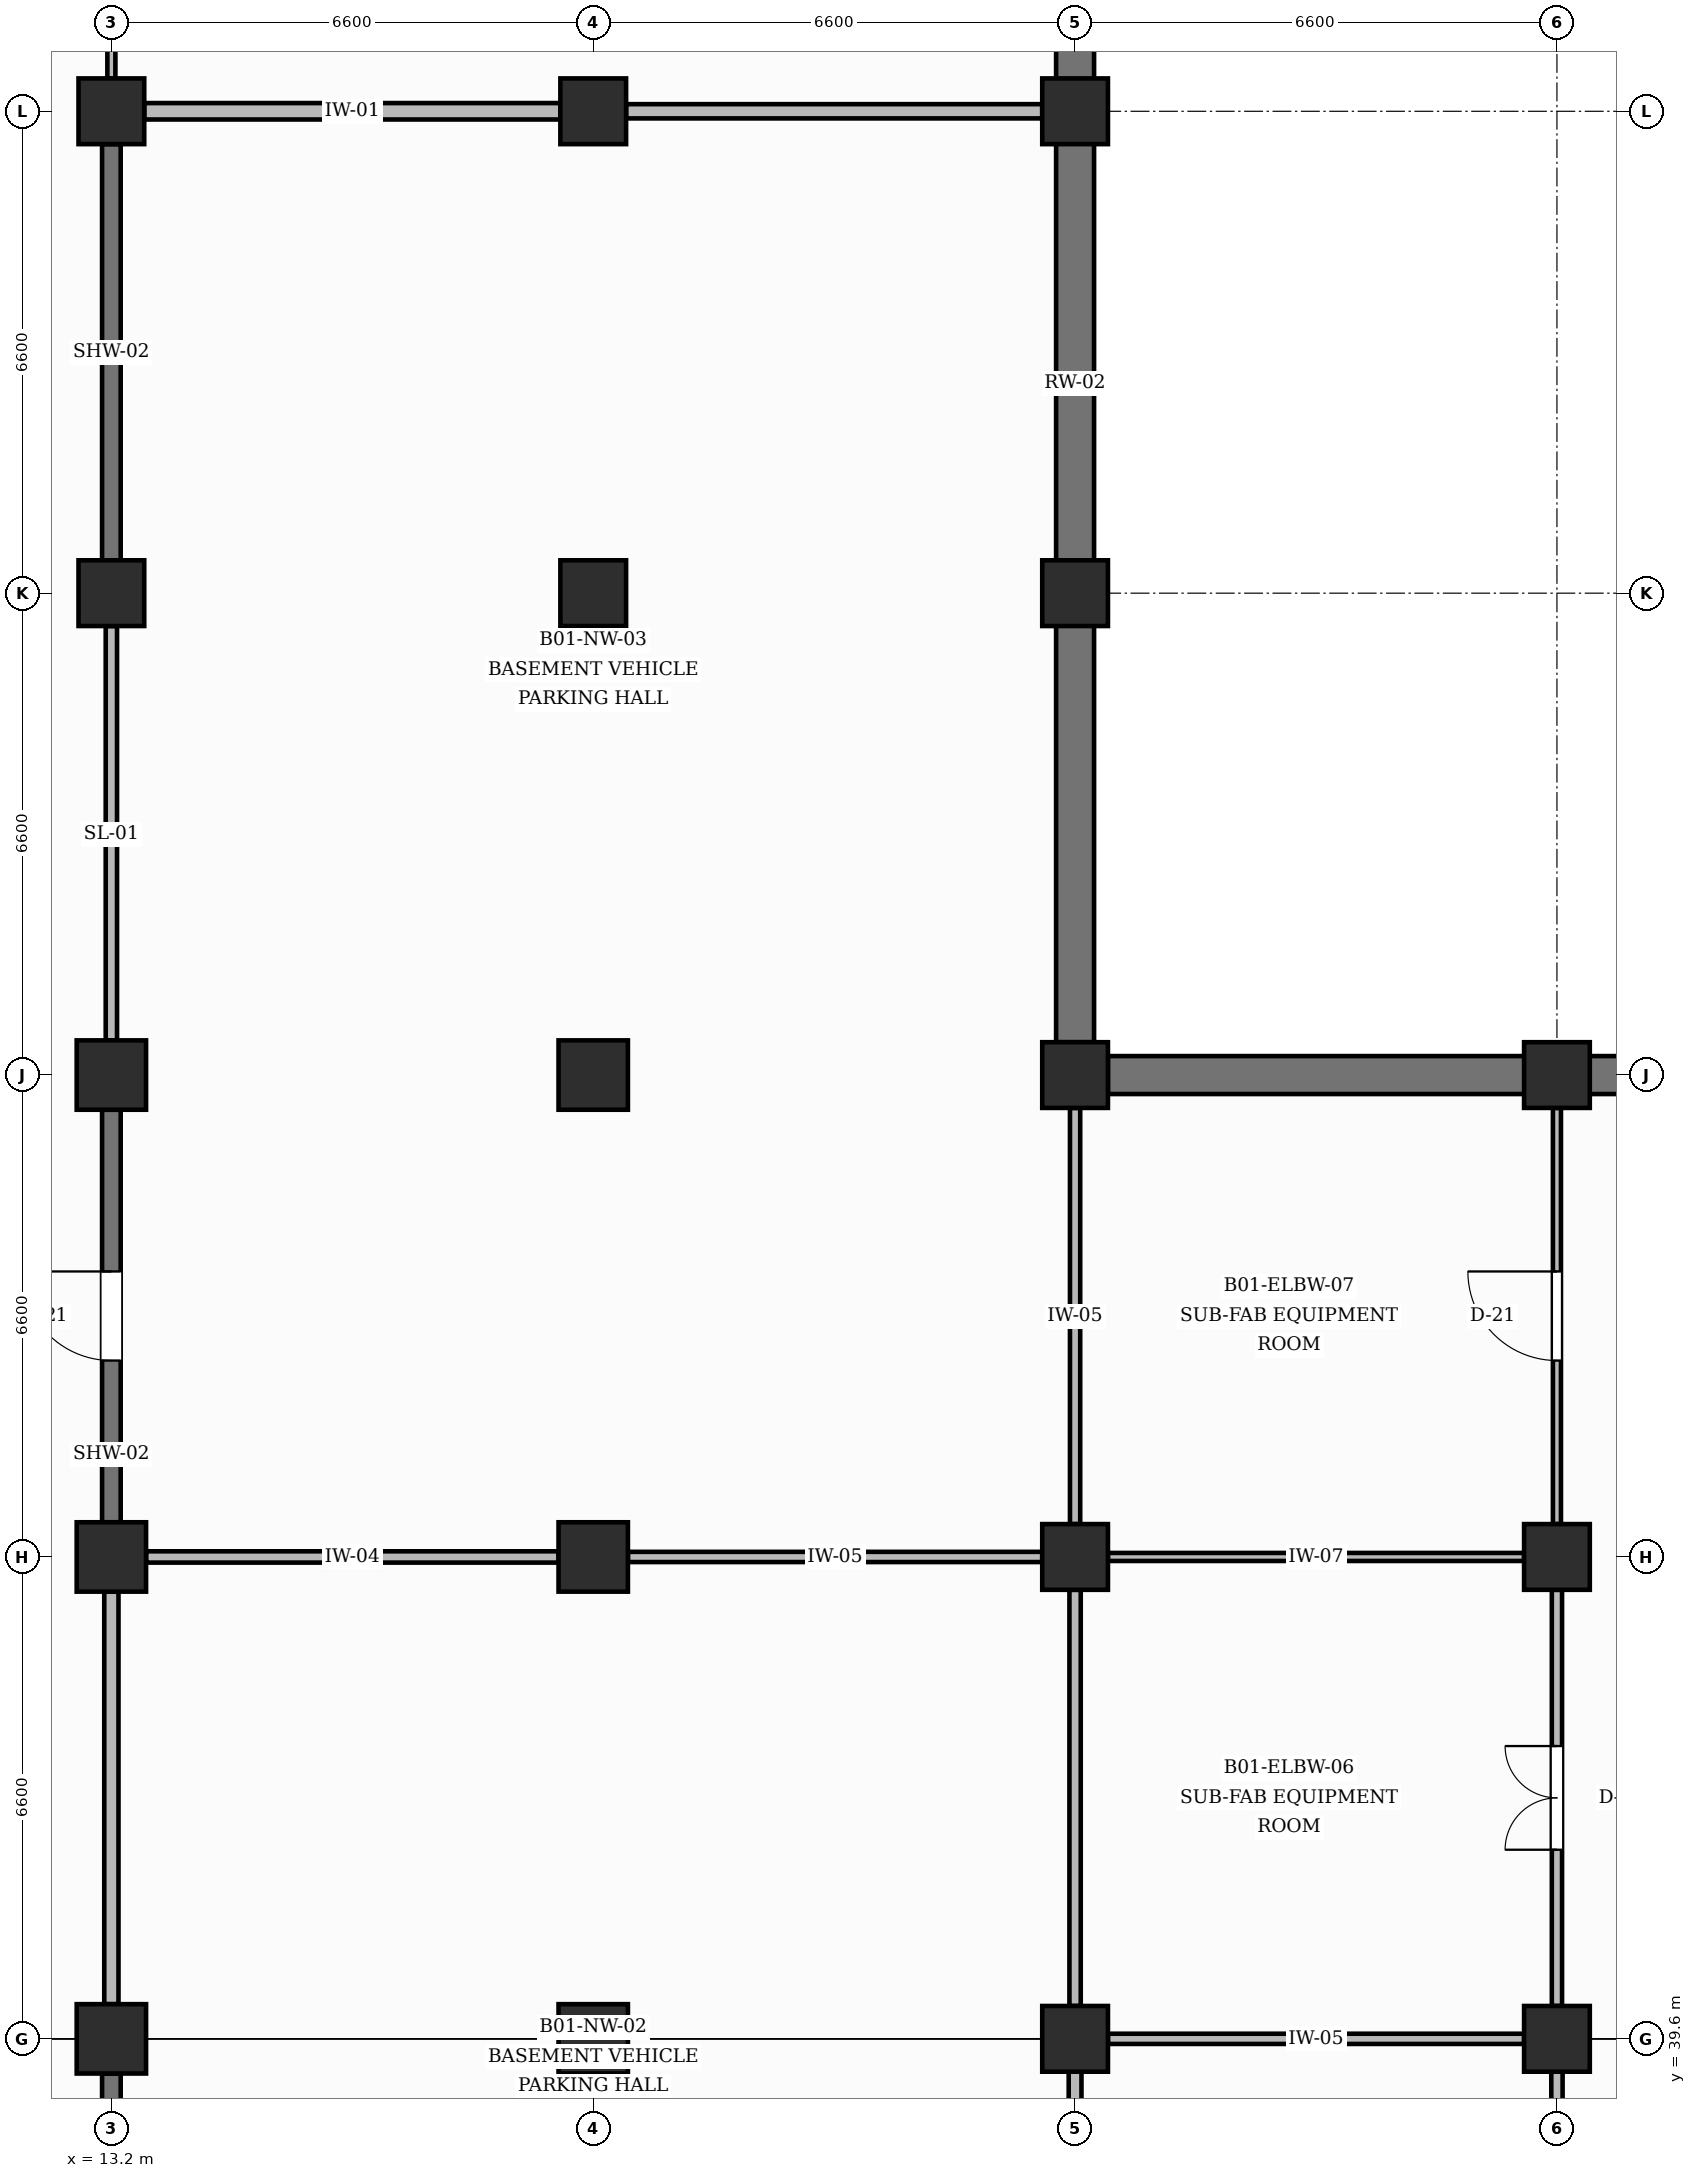
"""IFC4 building model, lengths in metres.
Left out: names, types, materials, properties, quantities, classifications, styles, units other than length and angle.
Written with IfcOpenShell. Run it as: python <this file> out.ifc"""

import sys

from ifc_helpers import new_model, si_unit, direction, frame, frame_2d, origin, origin_2d, place, context, subcontext, project, spatial, rectangle, extrude, element, fill, save


model = new_model("IFC4")
c1 = context("Model", 3, precision=1e-05, world=origin(), true_north=direction((0.0, 1.0)))
c2 = subcontext(c1, "Body", "Model", "MODEL_VIEW")
j1 = project(units=[si_unit("LENGTHUNIT", "METRE"), si_unit("PLANEANGLEUNIT", "RADIAN")], contexts=[c1])
p1 = place(None, origin())
s1 = spatial("IfcSite", under=j1, at=p1, CompositionType="ELEMENT")
p2 = place(p1, origin())
s2 = spatial("IfcBuilding", under=s1, at=p2, CompositionType="ELEMENT")
p3 = place(p2, frame((0.0, 0.0, -4.5)))
s3 = spatial("IfcBuildingStorey", under=s2, at=p3, CompositionType="ELEMENT", Elevation=-4.5)
for number, where, z_axis, x_axis in (
    (1, (13.2, 39.6, 0.0), (0.0, 0.0, 1.0), (1.0, 0.0, 0.0)),
    (2, (13.2, 46.2, 0.0), (0.0, 0.0, 1.0), (1.0, 0.0, 0.0)),
    (3, (13.2, 52.8, 0.0), (0.0, 0.0, 1.0), (1.0, 0.0, 0.0)),
):
    element("IfcColumn", number, at=place(p3, frame(where, z_axis=z_axis, x_axis=x_axis)), inside=s3, PredefinedType="COLUMN", context=c2, shape_type="SweptSolid", body=[
        extrude(rectangle(XDim=0.95, YDim=0.95, at=origin_2d()), origin(), (0.0, 0.0, 1.0), 4.5),
    ])
for number, where, z_axis, x_axis in (
    (4, (13.2, 59.4, 0.0), (0.0, 0.0, 1.0), (1.0, 0.0, 0.0)),
    (5, (13.2, 66.0, 0.0), (0.0, 0.0, 1.0), (1.0, 0.0, 0.0)),
):
    element("IfcColumn", number, at=place(p3, frame(where, z_axis=z_axis, x_axis=x_axis)), inside=s3, PredefinedType="COLUMN", context=c2, shape_type="SweptSolid", body=[
        extrude(rectangle(XDim=0.9, YDim=0.9, at=origin_2d()), origin(), (0.0, 0.0, 1.0), 4.5),
    ])
for number, where, z_axis, x_axis in (
    (6, (19.8, 39.6, 0.0), (0.0, 0.0, 1.0), (1.0, 0.0, 0.0)),
    (7, (19.8, 46.2, 0.0), (0.0, 0.0, 1.0), (1.0, 0.0, 0.0)),
    (8, (19.8, 52.8, 0.0), (0.0, 0.0, 1.0), (1.0, 0.0, 0.0)),
):
    element("IfcColumn", number, at=place(p3, frame(where, z_axis=z_axis, x_axis=x_axis)), inside=s3, PredefinedType="COLUMN", context=c2, shape_type="SweptSolid", body=[
        extrude(rectangle(XDim=0.95, YDim=0.95, at=origin_2d()), origin(), (0.0, 0.0, 1.0), 4.5),
    ])
for number, where, z_axis, x_axis in (
    (9, (19.8, 59.4, 0.0), (0.0, 0.0, 1.0), (1.0, 0.0, 0.0)),
    (10, (19.8, 66.0, 0.0), (0.0, 0.0, 1.0), (1.0, 0.0, 0.0)),
    (11, (26.4, 39.6, 0.0), (0.0, 0.0, 1.0), (1.0, 0.0, 0.0)),
    (12, (26.4, 46.2, 0.0), (0.0, 0.0, 1.0), (1.0, 0.0, 0.0)),
    (13, (26.4, 52.8, 0.0), (0.0, 0.0, 1.0), (1.0, 0.0, 0.0)),
    (14, (26.4, 59.4, 0.0), (0.0, 0.0, 1.0), (1.0, 0.0, 0.0)),
    (15, (26.4, 66.0, 0.0), (0.0, 0.0, 1.0), (1.0, 0.0, 0.0)),
    (16, (33.0, 39.6, 0.0), (0.0, 0.0, 1.0), (1.0, 0.0, 0.0)),
    (17, (33.0, 46.2, 0.0), (0.0, 0.0, 1.0), (1.0, 0.0, 0.0)),
    (18, (33.0, 52.8, 0.0), (0.0, 0.0, 1.0), (1.0, 0.0, 0.0)),
):
    element("IfcColumn", number, at=place(p3, frame(where, z_axis=z_axis, x_axis=x_axis)), inside=s3, PredefinedType="COLUMN", context=c2, shape_type="SweptSolid", body=[
        extrude(rectangle(XDim=0.9, YDim=0.9, at=origin_2d()), origin(), (0.0, 0.0, 1.0), 4.5),
    ])
for number, where, z_axis, x_axis in (
    (19, (26.4, 53.25, 0.0), (0.0, 0.0, 1.0), (0.0, 1.0, 0.0)),
    (20, (26.4, 59.85, 0.0), (0.0, 0.0, 1.0), (0.0, 1.0, 0.0)),
    (21, (26.4, 66.45, 0.0), (0.0, 0.0, 1.0), (0.0, 1.0, 0.0)),
    (22, (26.85, 52.8, 0.0), (0.0, 0.0, 1.0), (1.0, 0.0, 0.0)),
    (23, (33.45, 52.8, 0.0), (0.0, 0.0, 1.0), (1.0, 0.0, 0.0)),
):
    element("IfcWall", number, at=place(p3, frame(where, z_axis=z_axis, x_axis=x_axis)), inside=s3, PredefinedType="USERDEFINED", context=c2, shape_type="SweptSolid", body=[
        extrude(rectangle(XDim=5.7, YDim=0.52, at=frame_2d((2.85, 0.0))), origin(), (0.0, 0.0, 1.0), 3.49),
    ])
p4 = place(p3, frame((13.2, 33.475, 0.0), z_axis=(0.0, 0.0, 1.0), x_axis=(0.0, 1.0, 0.0)))
e24 = element("IfcWall", 24, at=p4, inside=s3, PredefinedType="SHEAR", context=c2, shape_type="SweptSolid", body=[
    extrude(rectangle(XDim=5.65, YDim=0.255, at=frame_2d((2.825, 0.0))), origin(), (0.0, 0.0, 1.0), 3.34),
])
p5 = place(p3, frame((13.2, 40.075, 0.0), z_axis=(0.0, 0.0, 1.0), x_axis=(0.0, 1.0, 0.0)))
e25 = element("IfcWall", 25, at=p5, inside=s3, PredefinedType="PARTITIONING", context=c2, shape_type="SweptSolid", body=[
    extrude(rectangle(XDim=5.65, YDim=0.195, at=frame_2d((2.825, 0.0))), origin(), (0.0, 0.0, 1.0), 3.34),
])
p6 = place(p3, frame((13.2, 46.675, 0.0), z_axis=(0.0, 0.0, 1.0), x_axis=(0.0, 1.0, 0.0)))
e26 = element("IfcWall", 26, at=p6, inside=s3, PredefinedType="SHEAR", context=c2, shape_type="SweptSolid", body=[
    extrude(rectangle(XDim=5.65, YDim=0.255, at=frame_2d((2.825, 0.0))), origin(), (0.0, 0.0, 1.0), 3.34),
])
p7 = place(p6, frame((2.215, 0.0, 0.0)))
e27 = element("IfcOpeningElement", 27, at=p7, cuts=e26, PredefinedType="OPENING", context=c2, shape_type="SweptSolid", body=[
    extrude(rectangle(XDim=1.22, YDim=2.15, at=frame_2d((0.61, 1.075))), frame((0.0, 0.137, 0.0), z_axis=(0.0, -1.0, 0.0), x_axis=(1.0, 0.0, 0.0)), (0.0, 0.0, 1.0), 0.275),
])
p8 = place(p3, frame((13.2, 53.275, 0.0), z_axis=(0.0, 0.0, 1.0), x_axis=(0.0, 1.0, 0.0)))
e28 = element("IfcWall", 28, at=p8, inside=s3, PredefinedType="PARTITIONING", context=c2, shape_type="SweptSolid", body=[
    extrude(rectangle(XDim=5.675, YDim=0.155, at=frame_2d((2.837, 0.0))), origin(), (0.0, 0.0, 1.0), 3.34),
])
p9 = place(p3, frame((13.2, 59.85, 0.0), z_axis=(0.0, 0.0, 1.0), x_axis=(0.0, 1.0, 0.0)))
e29 = element("IfcWall", 29, at=p9, inside=s3, PredefinedType="SHEAR", context=c2, shape_type="SweptSolid", body=[
    extrude(rectangle(XDim=5.7, YDim=0.255, at=frame_2d((2.85, 0.0))), origin(), (0.0, 0.0, 1.0), 3.34),
])
p10 = place(p3, frame((13.2, 66.45, 0.0), z_axis=(0.0, 0.0, 1.0), x_axis=(0.0, 1.0, 0.0)))
e30 = element("IfcWall", 30, at=p10, inside=s3, PredefinedType="PARTITIONING", context=c2, shape_type="SweptSolid", body=[
    extrude(rectangle(XDim=5.7, YDim=0.11, at=frame_2d((2.85, 0.0))), origin(), (0.0, 0.0, 1.0), 3.34),
])
p11 = place(p10, frame((2.14, 0.0, 0.0)))
e31 = element("IfcOpeningElement", 31, at=p11, cuts=e30, PredefinedType="OPENING", context=c2, shape_type="SweptSolid", body=[
    extrude(rectangle(XDim=1.42, YDim=2.2, at=frame_2d((0.71, 1.1))), frame((0.0, 0.065, 0.0), z_axis=(0.0, -1.0, 0.0), x_axis=(1.0, 0.0, 0.0)), (0.0, 0.0, 1.0), 0.13),
])
p12 = place(p3, frame((13.675, 46.2, 0.0), z_axis=(0.0, 0.0, 1.0), x_axis=(1.0, 0.0, 0.0)))
e32 = element("IfcWall", 32, at=p12, inside=s3, PredefinedType="PARTITIONING", context=c2, shape_type="SweptSolid", body=[
    extrude(rectangle(XDim=5.65, YDim=0.155, at=frame_2d((2.825, 0.0))), origin(), (0.0, 0.0, 1.0), 3.34),
])
p13 = place(p3, frame((13.65, 66.0, 0.0), z_axis=(0.0, 0.0, 1.0), x_axis=(1.0, 0.0, 0.0)))
e33 = element("IfcWall", 33, at=p13, inside=s3, PredefinedType="PARTITIONING", context=c2, shape_type="SweptSolid", body=[
    extrude(rectangle(XDim=5.7, YDim=0.225, at=frame_2d((2.85, 0.0))), origin(), (0.0, 0.0, 1.0), 3.24),
])
p14 = place(p3, frame((26.4, 33.45, 0.0), z_axis=(0.0, 0.0, 1.0), x_axis=(0.0, 1.0, 0.0)))
e34 = element("IfcWall", 34, at=p14, inside=s3, PredefinedType="PARTITIONING", context=c2, shape_type="SweptSolid", body=[
    extrude(rectangle(XDim=5.7, YDim=0.175, at=frame_2d((2.85, 0.0))), origin(), (0.0, 0.0, 1.0), 3.34),
])
p15 = place(p3, frame((26.4, 40.05, 0.0), z_axis=(0.0, 0.0, 1.0), x_axis=(0.0, 1.0, 0.0)))
e35 = element("IfcWall", 35, at=p15, inside=s3, PredefinedType="PARTITIONING", context=c2, shape_type="SweptSolid", body=[
    extrude(rectangle(XDim=5.7, YDim=0.155, at=frame_2d((2.85, 0.0))), origin(), (0.0, 0.0, 1.0), 3.34),
])
p16 = place(p3, frame((20.275, 46.2, 0.0), z_axis=(0.0, 0.0, 1.0), x_axis=(1.0, 0.0, 0.0)))
e36 = element("IfcWall", 36, at=p16, inside=s3, PredefinedType="PARTITIONING", context=c2, shape_type="SweptSolid", body=[
    extrude(rectangle(XDim=5.675, YDim=0.14, at=frame_2d((2.837, 0.0))), origin(), (0.0, 0.0, 1.0), 3.24),
])
p17 = place(p3, frame((26.4, 46.65, 0.0), z_axis=(0.0, 0.0, 1.0), x_axis=(0.0, 1.0, 0.0)))
e37 = element("IfcWall", 37, at=p17, inside=s3, PredefinedType="PARTITIONING", context=c2, shape_type="SweptSolid", body=[
    extrude(rectangle(XDim=5.7, YDim=0.14, at=frame_2d((2.85, 0.0))), origin(), (0.0, 0.0, 1.0), 3.34),
])
p18 = place(p3, frame((20.25, 66.0, 0.0), z_axis=(0.0, 0.0, 1.0), x_axis=(1.0, 0.0, 0.0)))
e38 = element("IfcWall", 38, at=p18, inside=s3, PredefinedType="PARTITIONING", context=c2, shape_type="SweptSolid", body=[
    extrude(rectangle(XDim=5.7, YDim=0.195, at=frame_2d((2.85, 0.0))), origin(), (0.0, 0.0, 1.0), 3.34),
])
p19 = place(p3, frame((33.0, 33.45, 0.0), z_axis=(0.0, 0.0, 1.0), x_axis=(0.0, 1.0, 0.0)))
e39 = element("IfcWall", 39, at=p19, inside=s3, PredefinedType="PARTITIONING", context=c2, shape_type="SweptSolid", body=[
    extrude(rectangle(XDim=5.7, YDim=0.155, at=frame_2d((2.85, 0.0))), origin(), (0.0, 0.0, 1.0), 3.34),
])
p20 = place(p19, frame((2.24, 0.0, 0.0)))
e40 = element("IfcOpeningElement", 40, at=p20, cuts=e39, PredefinedType="OPENING", context=c2, shape_type="SweptSolid", body=[
    extrude(rectangle(XDim=1.22, YDim=2.15, at=frame_2d((0.61, 1.075))), frame((0.0, 0.087, 0.0), z_axis=(0.0, -1.0, 0.0), x_axis=(1.0, 0.0, 0.0)), (0.0, 0.0, 1.0), 0.175),
])
p21 = place(p3, frame((26.85, 39.6, 0.0), z_axis=(0.0, 0.0, 1.0), x_axis=(1.0, 0.0, 0.0)))
e41 = element("IfcWall", 41, at=p21, inside=s3, PredefinedType="PARTITIONING", context=c2, shape_type="SweptSolid", body=[
    extrude(rectangle(XDim=5.7, YDim=0.14, at=frame_2d((2.85, 0.0))), origin(), (0.0, 0.0, 1.0), 3.24),
])
p22 = place(p3, frame((33.0, 40.05, 0.0), z_axis=(0.0, 0.0, 1.0), x_axis=(0.0, 1.0, 0.0)))
e42 = element("IfcWall", 42, at=p22, inside=s3, PredefinedType="PARTITIONING", context=c2, shape_type="SweptSolid", body=[
    extrude(rectangle(XDim=5.7, YDim=0.14, at=frame_2d((2.85, 0.0))), origin(), (0.0, 0.0, 1.0), 3.34),
])
p23 = place(p22, frame((2.14, 0.0, 0.0)))
e43 = element("IfcOpeningElement", 43, at=p23, cuts=e42, PredefinedType="OPENING", context=c2, shape_type="SweptSolid", body=[
    extrude(rectangle(XDim=1.42, YDim=2.2, at=frame_2d((0.71, 1.1))), frame((0.0, 0.08, 0.0), z_axis=(0.0, -1.0, 0.0), x_axis=(1.0, 0.0, 0.0)), (0.0, 0.0, 1.0), 0.16),
])
p24 = place(p3, frame((26.85, 46.2, 0.0), z_axis=(0.0, 0.0, 1.0), x_axis=(1.0, 0.0, 0.0)))
e44 = element("IfcWall", 44, at=p24, inside=s3, PredefinedType="PARTITIONING", context=c2, shape_type="SweptSolid", body=[
    extrude(rectangle(XDim=5.7, YDim=0.11, at=frame_2d((2.85, 0.0))), origin(), (0.0, 0.0, 1.0), 3.34),
])
p25 = place(p3, frame((33.0, 46.65, 0.0), z_axis=(0.0, 0.0, 1.0), x_axis=(0.0, 1.0, 0.0)))
e45 = element("IfcWall", 45, at=p25, inside=s3, PredefinedType="PARTITIONING", context=c2, shape_type="SweptSolid", body=[
    extrude(rectangle(XDim=5.7, YDim=0.11, at=frame_2d((2.85, 0.0))), origin(), (0.0, 0.0, 1.0), 3.34),
])
p26 = place(p25, frame((2.24, 0.0, 0.0)))
e46 = element("IfcOpeningElement", 46, at=p26, cuts=e45, PredefinedType="OPENING", context=c2, shape_type="SweptSolid", body=[
    extrude(rectangle(XDim=1.22, YDim=2.15, at=frame_2d((0.61, 1.075))), frame((0.0, 0.065, 0.0), z_axis=(0.0, -1.0, 0.0), x_axis=(1.0, 0.0, 0.0)), (0.0, 0.0, 1.0), 0.13),
])
p27 = place(p23, origin())
e47 = element("IfcDoor", 47, at=p27, inside=s3, OperationType="DOUBLE_DOOR_SINGLE_SWING", PredefinedType="DOOR", context=c2, shape_type="SweptSolid", body=[
    extrude(rectangle(XDim=1.42, YDim=2.2, at=frame_2d((0.71, 1.1))), frame((0.0, 0.025, 0.0), z_axis=(0.0, -1.0, 0.0), x_axis=(1.0, 0.0, 0.0)), (0.0, 0.0, 1.0), 0.05),
])
fill(e43, e47)
p28 = place(p26, origin())
e48 = element("IfcDoor", 48, at=p28, inside=s3, OperationType="SINGLE_SWING_RIGHT", PredefinedType="DOOR", context=c2, shape_type="SweptSolid", body=[
    extrude(rectangle(XDim=1.22, YDim=2.15, at=frame_2d((0.61, 1.075))), frame((0.0, 0.025, 0.0), z_axis=(0.0, -1.0, 0.0), x_axis=(1.0, 0.0, 0.0)), (0.0, 0.0, 1.0), 0.05),
])
fill(e46, e48)
p29 = place(p7, origin())
e49 = element("IfcDoor", 49, at=p29, inside=s3, OperationType="SINGLE_SWING_RIGHT", PredefinedType="DOOR", context=c2, shape_type="SweptSolid", body=[
    extrude(rectangle(XDim=1.22, YDim=2.15, at=frame_2d((0.61, 1.075))), frame((0.0, 0.025, 0.0), z_axis=(0.0, -1.0, 0.0), x_axis=(1.0, 0.0, 0.0)), (0.0, 0.0, 1.0), 0.05),
])
fill(e27, e49)
save(model, sys.argv[1])
